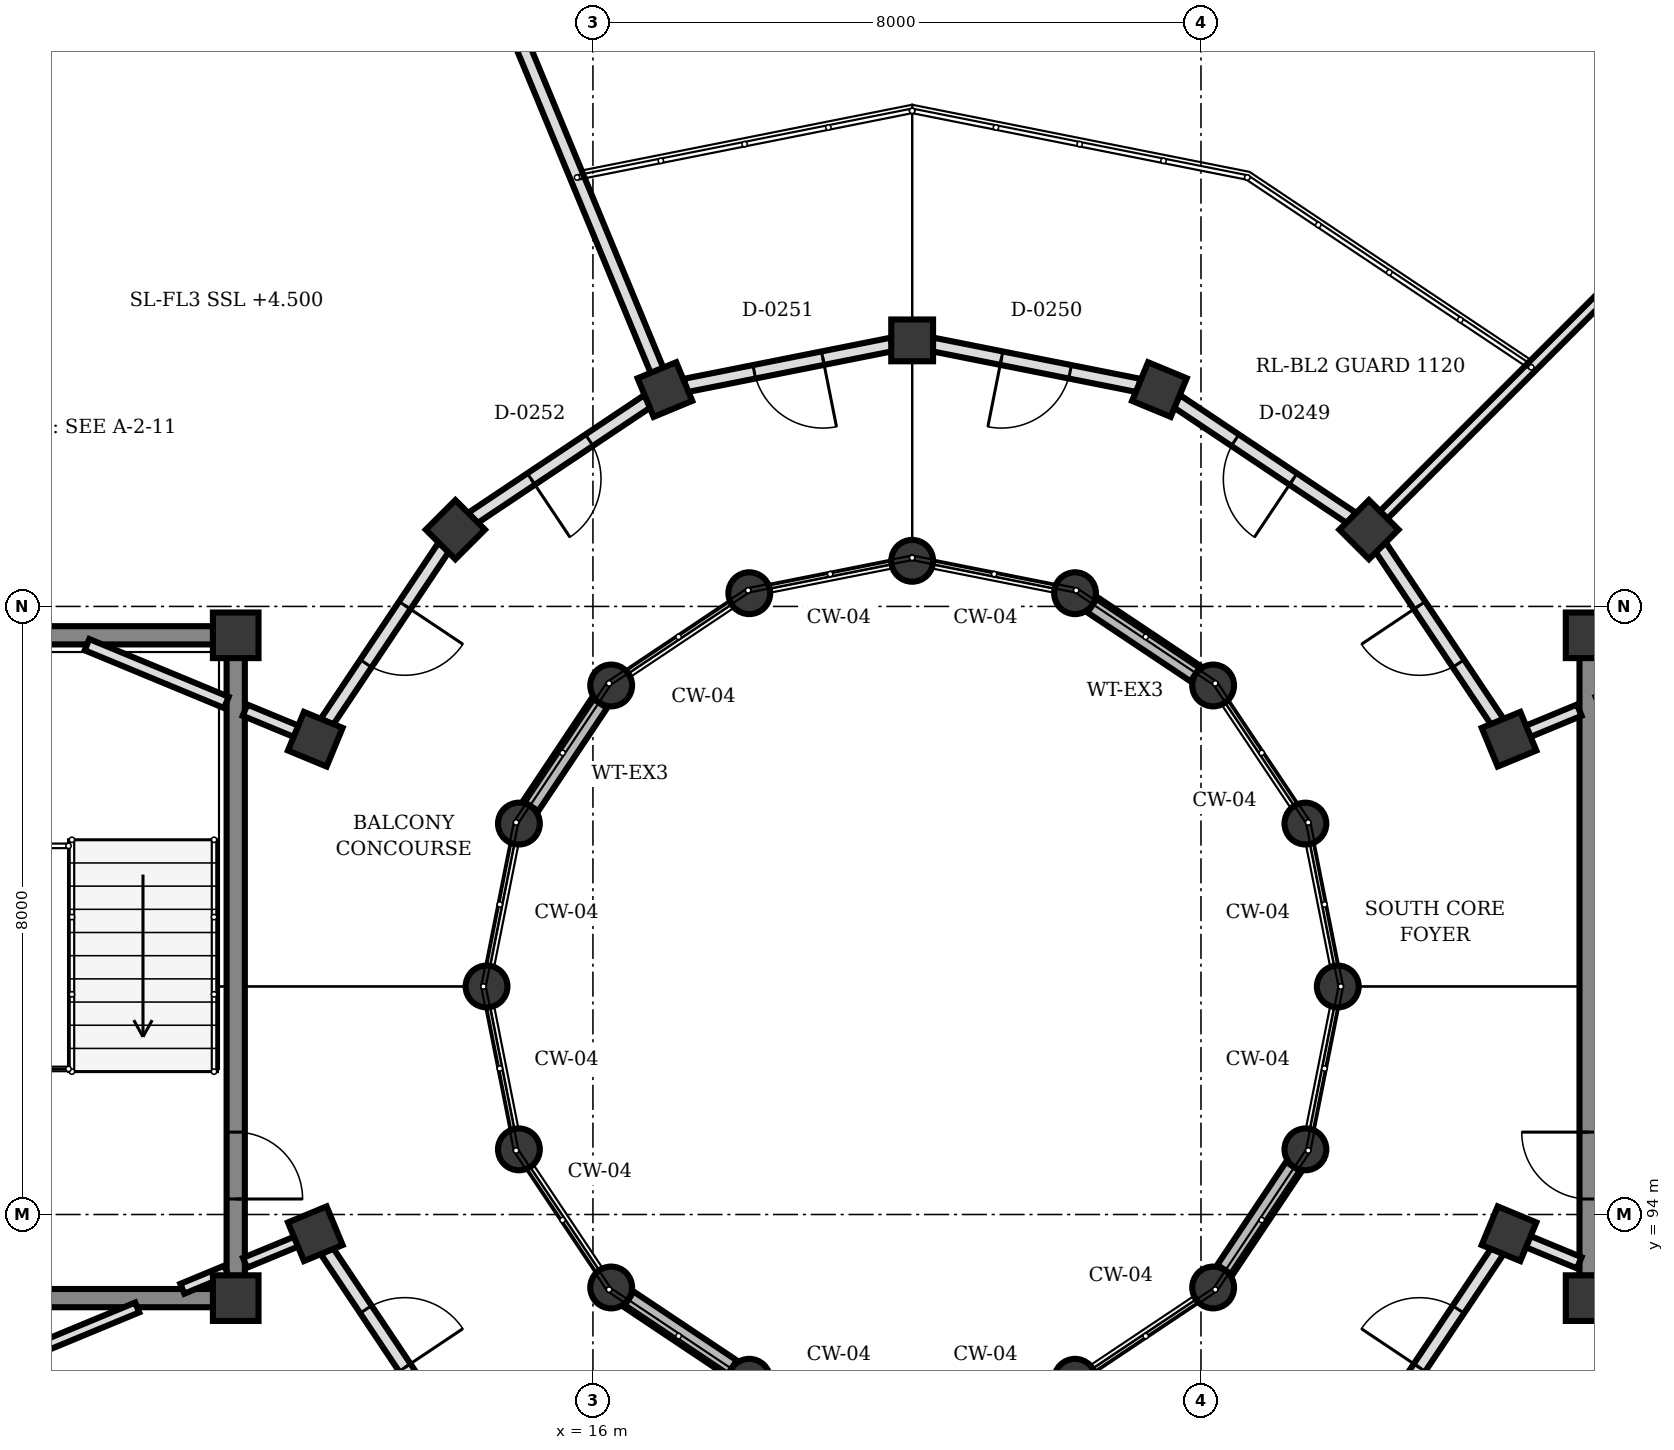
"""IFC4 building model, lengths in metres.
Left out: names, types, materials, properties, quantities, classifications, styles, units other than length and angle.
Written with IfcOpenShell. Run it as: python <this file> out.ifc"""

import sys

from ifc_helpers import new_model, si_unit, direction, frame, frame_2d, origin, origin_2d, place, context, subcontext, project, spatial, rectangle, circle, extrude, element, fill, save


model = new_model("IFC4")
c1 = context("Model", 3, precision=1e-05, world=origin(), true_north=direction((0.0, 1.0)))
c2 = subcontext(c1, "Body", "Model", "MODEL_VIEW")
j1 = project(units=[si_unit("LENGTHUNIT", "METRE"), si_unit("PLANEANGLEUNIT", "RADIAN")], contexts=[c1])
p1 = place(None, origin())
s1 = spatial("IfcSite", under=j1, at=p1, CompositionType="ELEMENT")
p2 = place(p1, origin())
s2 = spatial("IfcBuilding", under=s1, at=p2, CompositionType="ELEMENT")
p3 = place(p2, frame((0.0, 0.0, 4.5)))
s3 = spatial("IfcBuildingStorey", under=s2, at=p3, CompositionType="ELEMENT", Elevation=4.5)
for number, where, z_axis, x_axis in (
    (1, (11.3, 92.9, 0.0), (0.0, 0.0, 1.0), (1.0, 0.0, 0.0)),
    (2, (11.3, 101.62, 0.0), (0.0, 0.0, 1.0), (1.0, 0.0, 0.0)),
    (3, (29.1, 92.9, 0.0), (0.0, 0.0, 1.0), (1.0, 0.0, 0.0)),
    (4, (29.1, 101.62, 0.0), (0.0, 0.0, 1.0), (1.0, 0.0, 0.0)),
):
    element("IfcColumn", number, at=place(p3, frame(where, z_axis=z_axis, x_axis=x_axis)), inside=s3, PredefinedType="COLUMN", context=c2, shape_type="SweptSolid", body=[
        extrude(rectangle(XDim=0.6, YDim=0.6, at=origin_2d()), origin(), (0.0, 0.0, 1.0), 4.0),
    ])
for number, where, z_axis, x_axis in (
    (5, (25.8, 97.0, 0.0), (0.0, 0.0, 1.0), (1.0, 0.0, 0.0)),
    (6, (25.374, 99.143, 0.0), (0.0, 0.0, 1.0), (1.0, 0.0, 0.0)),
    (7, (24.16, 100.96, 0.0), (0.0, 0.0, 1.0), (1.0, 0.0, 0.0)),
    (8, (22.343, 102.174, 0.0), (0.0, 0.0, 1.0), (1.0, 0.0, 0.0)),
    (9, (20.2, 102.6, 0.0), (0.0, 0.0, 1.0), (1.0, 0.0, 0.0)),
    (10, (18.057, 102.174, 0.0), (0.0, 0.0, 1.0), (1.0, 0.0, 0.0)),
    (11, (16.24, 100.96, 0.0), (0.0, 0.0, 1.0), (1.0, 0.0, 0.0)),
    (12, (15.026, 99.143, 0.0), (0.0, 0.0, 1.0), (1.0, 0.0, 0.0)),
    (13, (14.6, 97.0, 0.0), (0.0, 0.0, 1.0), (1.0, 0.0, 0.0)),
    (14, (15.026, 94.857, 0.0), (0.0, 0.0, 1.0), (1.0, 0.0, 0.0)),
    (15, (16.24, 93.04, 0.0), (0.0, 0.0, 1.0), (1.0, 0.0, 0.0)),
    (16, (18.057, 91.826, 0.0), (0.0, 0.0, 1.0), (1.0, 0.0, 0.0)),
    (17, (22.343, 91.826, 0.0), (0.0, 0.0, 1.0), (1.0, 0.0, 0.0)),
    (18, (24.16, 93.04, 0.0), (0.0, 0.0, 1.0), (1.0, 0.0, 0.0)),
    (19, (25.374, 94.857, 0.0), (0.0, 0.0, 1.0), (1.0, 0.0, 0.0)),
):
    element("IfcColumn", number, at=place(p3, frame(where, z_axis=z_axis, x_axis=x_axis)), inside=s3, PredefinedType="COLUMN", context=c2, shape_type="SweptSolid", body=[
        extrude(circle(Radius=0.275, at=origin_2d()), origin(), (0.0, 0.0, 1.0), 4.0),
    ])
for number, where, z_axis, x_axis in (
    (20, (28.053, 100.253, 0.0), (0.0, 0.0, 1.0), (0.924, 0.383, 0.0)),
    (21, (26.21, 103.01, 0.0), (0.0, 0.0, 1.0), (0.707, 0.707, 0.0)),
    (22, (23.453, 104.853, 0.0), (0.0, 0.0, 1.0), (0.383, 0.924, 0.0)),
    (23, (20.2, 105.5, 0.0), (0.0, 0.0, 1.0), (0.0, 1.0, 0.0)),
    (24, (16.947, 104.853, 0.0), (0.0, 0.0, 1.0), (-0.383, 0.924, 0.0)),
    (25, (14.19, 103.01, 0.0), (0.0, 0.0, 1.0), (-0.707, 0.707, 0.0)),
    (26, (12.347, 100.253, 0.0), (0.0, 0.0, 1.0), (-0.924, 0.383, 0.0)),
    (27, (12.347, 93.747, 0.0), (0.0, 0.0, 1.0), (-0.924, -0.383, 0.0)),
    (28, (28.053, 93.747, 0.0), (0.0, 0.0, 1.0), (0.924, -0.383, 0.0)),
):
    element("IfcColumn", number, at=place(p3, frame(where, z_axis=z_axis, x_axis=x_axis)), inside=s3, PredefinedType="COLUMN", context=c2, shape_type="SweptSolid", body=[
        extrude(rectangle(XDim=0.55, YDim=0.55, at=origin_2d()), origin(), (0.0, 0.0, 1.0), 4.0),
    ])
for number, where, z_axis, x_axis in (
    (29, (23.93, 101.114, 0.0), (0.0, 0.0, 1.0), (-0.832, 0.555, 0.0)),
    (30, (16.086, 100.73, 0.0), (0.0, 0.0, 1.0), (-0.555, -0.832, 0.0)),
    (31, (16.47, 92.886, 0.0), (0.0, 0.0, 1.0), (0.832, -0.555, 0.0)),
    (32, (24.314, 93.27, 0.0), (0.0, 0.0, 1.0), (0.555, 0.832, 0.0)),
):
    element("IfcWall", number, at=place(p3, frame(where, z_axis=z_axis, x_axis=x_axis)), inside=s3, PredefinedType="SOLIDWALL", context=c2, shape_type="SweptSolid", body=[
        extrude(rectangle(XDim=1.632, YDim=0.24, at=frame_2d((0.816, 0.0))), origin(), (0.0, 0.0, 1.0), 3.222),
    ])
p4 = place(p3, frame((11.3, 101.328, 0.0), z_axis=(0.0, 0.0, 1.0), x_axis=(0.0, -1.0, 0.0)))
e33 = element("IfcWall", 33, at=p4, inside=s3, PredefinedType="SHEAR", context=c2, shape_type="SweptSolid", body=[
    extrude(rectangle(XDim=8.136, YDim=0.24, at=frame_2d((4.068, 0.0))), origin(), (0.0, 0.0, 1.0), 3.74),
])
p5 = place(p4, frame((6.244, 0.0, 0.0)))
e34 = element("IfcOpeningElement", 34, at=p5, cuts=e33, PredefinedType="OPENING", context=c2, shape_type="SweptSolid", body=[
    extrude(rectangle(XDim=0.88, YDim=2.1, at=frame_2d((0.44, 1.05))), frame((0.0, 0.13, 0.0), z_axis=(0.0, -1.0, 0.0), x_axis=(1.0, 0.0, 0.0)), (0.0, 0.0, 1.0), 0.26),
])
for number, where, z_axis, x_axis in (
    (35, (11.008, 92.9, 0.0), (0.0, 0.0, 1.0), (-1.0, 0.0, 0.0)),
    (36, (11.008, 101.62, 0.0), (0.0, 0.0, 1.0), (-1.0, 0.0, 0.0)),
):
    element("IfcWall", number, at=place(p3, frame(where, z_axis=z_axis, x_axis=x_axis)), inside=s3, PredefinedType="SHEAR", context=c2, shape_type="SweptSolid", body=[
        extrude(rectangle(XDim=4.216, YDim=0.24, at=frame_2d((2.108, 0.0))), origin(), (0.0, 0.0, 1.0), 3.74),
    ])
p6 = place(p3, frame((29.1, 93.192, 0.0), z_axis=(0.0, 0.0, 1.0), x_axis=(0.0, 1.0, 0.0)))
e37 = element("IfcWall", 37, at=p6, inside=s3, PredefinedType="SHEAR", context=c2, shape_type="SweptSolid", body=[
    extrude(rectangle(XDim=8.136, YDim=0.24, at=frame_2d((4.068, 0.0))), origin(), (0.0, 0.0, 1.0), 3.74),
])
p7 = place(p6, frame((1.012, 0.0, 0.0)))
e38 = element("IfcOpeningElement", 38, at=p7, cuts=e37, PredefinedType="OPENING", context=c2, shape_type="SweptSolid", body=[
    extrude(rectangle(XDim=0.88, YDim=2.1, at=frame_2d((0.44, 1.05))), frame((0.0, 0.13, 0.0), z_axis=(0.0, -1.0, 0.0), x_axis=(1.0, 0.0, 0.0)), (0.0, 0.0, 1.0), 0.26),
])
p8 = place(p3, frame((28.3, 100.355, 0.0), z_axis=(0.0, 0.0, 1.0), x_axis=(0.924069600435, 0.382224245113, 0.0)))
e39 = element("IfcWall", 39, at=p8, inside=s3, PredefinedType="PARTITIONING", context=c2, shape_type="SweptSolid", body=[
    extrude(rectangle(XDim=0.733, YDim=0.16, at=frame_2d((0.366, 0.0))), origin(), (0.0, 0.0, 1.0), 3.7),
])
p9 = place(p3, frame((26.399, 103.199, 0.0), z_axis=(0.0, 0.0, 1.0), x_axis=(0.707106781187, 0.707106781187, 0.0)))
e40 = element("IfcWall", 40, at=p9, inside=s3, PredefinedType="PARTITIONING", context=c2, shape_type="SweptSolid", body=[
    extrude(rectangle(XDim=8.441, YDim=0.14, at=frame_2d((4.221, 0.0))), origin(), (0.0, 0.0, 1.0), 3.072),
])
p10 = place(p3, frame((12.1, 100.355, 0.0), z_axis=(0.0, 0.0, 1.0), x_axis=(-0.924069600435, 0.382224245113, 0.0)))
e41 = element("IfcWall", 41, at=p10, inside=s3, PredefinedType="PARTITIONING", context=c2, shape_type="SweptSolid", body=[
    extrude(rectangle(XDim=0.733, YDim=0.16, at=frame_2d((0.366, 0.0))), origin(), (0.0, 0.0, 1.0), 3.7),
])
p11 = place(p3, frame((11.177, 100.737, 0.0), z_axis=(0.0, 0.0, 1.0), x_axis=(-0.923817443679, 0.382833293686, 0.0)))
e42 = element("IfcWall", 42, at=p11, inside=s3, PredefinedType="PARTITIONING", context=c2, shape_type="SweptSolid", body=[
    extrude(rectangle(XDim=1.985, YDim=0.16, at=frame_2d((0.993, 0.0))), origin(), (0.0, 0.0, 1.0), 3.7),
])
p12 = place(p3, frame((12.1, 93.645, 0.0), z_axis=(0.0, 0.0, 1.0), x_axis=(-0.924069600435, -0.382224245113, 0.0)))
e43 = element("IfcWall", 43, at=p12, inside=s3, PredefinedType="PARTITIONING", context=c2, shape_type="SweptSolid", body=[
    extrude(rectangle(XDim=0.733, YDim=0.14, at=frame_2d((0.366, 0.0))), origin(), (0.0, 0.0, 1.0), 3.072),
])
p13 = place(p3, frame((11.177, 93.263, 0.0), z_axis=(0.0, 0.0, 1.0), x_axis=(-0.923812676193, -0.382844797933, 0.0)))
e44 = element("IfcWall", 44, at=p13, inside=s3, PredefinedType="PARTITIONING", context=c2, shape_type="SweptSolid", body=[
    extrude(rectangle(XDim=0.627, YDim=0.14, at=frame_2d((0.313, 0.0))), origin(), (0.0, 0.0, 1.0), 3.072),
])
p14 = place(p3, frame((10.004, 92.777, 0.0), z_axis=(0.0, 0.0, 1.0), x_axis=(-0.923864955254, -0.382718623082, 0.0)))
e45 = element("IfcWall", 45, at=p14, inside=s3, PredefinedType="PARTITIONING", context=c2, shape_type="SweptSolid", body=[
    extrude(rectangle(XDim=6.172, YDim=0.14, at=frame_2d((3.086, 0.0))), origin(), (0.0, 0.0, 1.0), 3.072),
])
p15 = place(p3, frame((28.3, 93.645, 0.0), z_axis=(0.0, 0.0, 1.0), x_axis=(0.924069600435, -0.382224245113, 0.0)))
e46 = element("IfcWall", 46, at=p15, inside=s3, PredefinedType="PARTITIONING", context=c2, shape_type="SweptSolid", body=[
    extrude(rectangle(XDim=0.733, YDim=0.16, at=frame_2d((0.366, 0.0))), origin(), (0.0, 0.0, 1.0), 3.072),
])
p16 = place(p3, frame((27.902, 100.479, 0.0), z_axis=(0.0, 0.0, 1.0), x_axis=(-0.555797002478, 0.831318045056, 0.0)))
e47 = element("IfcWall", 47, at=p16, inside=s3, PredefinedType="PARTITIONING", context=c2, shape_type="SweptSolid", body=[
    extrude(rectangle(XDim=2.773, YDim=0.18, at=frame_2d((1.386, 0.0))), origin(), (0.0, 0.0, 1.0), 3.072),
])
p17 = place(p16, frame((0.926, 0.0, 0.0)))
e48 = element("IfcOpeningElement", 48, at=p17, cuts=e47, PredefinedType="OPENING", context=c2, shape_type="SweptSolid", body=[
    extrude(rectangle(XDim=0.92, YDim=2.1, at=frame_2d((0.46, 1.05))), frame((0.0, 0.1, 0.0), z_axis=(0.0, -1.0, 0.0), x_axis=(1.0, 0.0, 0.0)), (0.0, 0.0, 1.0), 0.2),
])
p18 = place(p3, frame((25.984, 103.161, 0.0), z_axis=(0.0, 0.0, 1.0), x_axis=(-0.831318045056, 0.555797002478, 0.0)))
e49 = element("IfcWall", 49, at=p18, inside=s3, PredefinedType="PARTITIONING", context=c2, shape_type="SweptSolid", body=[
    extrude(rectangle(XDim=2.773, YDim=0.18, at=frame_2d((1.386, 0.0))), origin(), (0.0, 0.0, 1.0), 3.072),
])
p19 = place(p18, frame((0.926, 0.0, 0.0)))
e50 = element("IfcOpeningElement", 50, at=p19, cuts=e49, PredefinedType="OPENING", context=c2, shape_type="SweptSolid", body=[
    extrude(rectangle(XDim=0.92, YDim=2.1, at=frame_2d((0.46, 1.05))), frame((0.0, 0.1, 0.0), z_axis=(0.0, -1.0, 0.0), x_axis=(1.0, 0.0, 0.0)), (0.0, 0.0, 1.0), 0.2),
])
p20 = place(p3, frame((23.186, 104.906, 0.0), z_axis=(0.0, 0.0, 1.0), x_axis=(-0.980773264811, 0.195150718759, 0.0)))
e51 = element("IfcWall", 51, at=p20, inside=s3, PredefinedType="PARTITIONING", context=c2, shape_type="SweptSolid", body=[
    extrude(rectangle(XDim=2.772, YDim=0.18, at=frame_2d((1.386, 0.0))), origin(), (0.0, 0.0, 1.0), 3.072),
])
p21 = place(p20, frame((0.926, 0.0, 0.0)))
e52 = element("IfcOpeningElement", 52, at=p21, cuts=e51, PredefinedType="OPENING", context=c2, shape_type="SweptSolid", body=[
    extrude(rectangle(XDim=0.92, YDim=2.1, at=frame_2d((0.46, 1.05))), frame((0.0, 0.1, 0.0), z_axis=(0.0, -1.0, 0.0), x_axis=(1.0, 0.0, 0.0)), (0.0, 0.0, 1.0), 0.2),
])
p22 = place(p3, frame((19.933, 105.447, 0.0), z_axis=(0.0, 0.0, 1.0), x_axis=(-0.980773264811, -0.195150718759, 0.0)))
e53 = element("IfcWall", 53, at=p22, inside=s3, PredefinedType="PARTITIONING", context=c2, shape_type="SweptSolid", body=[
    extrude(rectangle(XDim=2.772, YDim=0.18, at=frame_2d((1.386, 0.0))), origin(), (0.0, 0.0, 1.0), 3.072),
])
p23 = place(p22, frame((0.926, 0.0, 0.0)))
e54 = element("IfcOpeningElement", 54, at=p23, cuts=e53, PredefinedType="OPENING", context=c2, shape_type="SweptSolid", body=[
    extrude(rectangle(XDim=0.92, YDim=2.1, at=frame_2d((0.46, 1.05))), frame((0.0, 0.1, 0.0), z_axis=(0.0, -1.0, 0.0), x_axis=(1.0, 0.0, 0.0)), (0.0, 0.0, 1.0), 0.2),
])
p24 = place(p3, frame((16.721, 104.702, 0.0), z_axis=(0.0, 0.0, 1.0), x_axis=(-0.831318045056, -0.555797002478, 0.0)))
e55 = element("IfcWall", 55, at=p24, inside=s3, PredefinedType="PARTITIONING", context=c2, shape_type="SweptSolid", body=[
    extrude(rectangle(XDim=2.773, YDim=0.18, at=frame_2d((1.386, 0.0))), origin(), (0.0, 0.0, 1.0), 3.072),
])
p25 = place(p24, frame((0.926, 0.0, 0.0)))
e56 = element("IfcOpeningElement", 56, at=p25, cuts=e55, PredefinedType="OPENING", context=c2, shape_type="SweptSolid", body=[
    extrude(rectangle(XDim=0.92, YDim=2.1, at=frame_2d((0.46, 1.05))), frame((0.0, 0.1, 0.0), z_axis=(0.0, -1.0, 0.0), x_axis=(1.0, 0.0, 0.0)), (0.0, 0.0, 1.0), 0.2),
])
p26 = place(p3, frame((14.039, 102.784, 0.0), z_axis=(0.0, 0.0, 1.0), x_axis=(-0.555797002478, -0.831318045056, 0.0)))
e57 = element("IfcWall", 57, at=p26, inside=s3, PredefinedType="PARTITIONING", context=c2, shape_type="SweptSolid", body=[
    extrude(rectangle(XDim=2.773, YDim=0.18, at=frame_2d((1.386, 0.0))), origin(), (0.0, 0.0, 1.0), 3.072),
])
p27 = place(p26, frame((0.926, 0.0, 0.0)))
e58 = element("IfcOpeningElement", 58, at=p27, cuts=e57, PredefinedType="OPENING", context=c2, shape_type="SweptSolid", body=[
    extrude(rectangle(XDim=0.92, YDim=2.1, at=frame_2d((0.46, 1.05))), frame((0.0, 0.1, 0.0), z_axis=(0.0, -1.0, 0.0), x_axis=(1.0, 0.0, 0.0)), (0.0, 0.0, 1.0), 0.2),
])
p28 = place(p3, frame((12.498, 93.521, 0.0), z_axis=(0.0, 0.0, 1.0), x_axis=(0.555797002478, -0.831318045056, 0.0)))
e59 = element("IfcWall", 59, at=p28, inside=s3, PredefinedType="PARTITIONING", context=c2, shape_type="SweptSolid", body=[
    extrude(rectangle(XDim=2.773, YDim=0.18, at=frame_2d((1.386, 0.0))), origin(), (0.0, 0.0, 1.0), 3.072),
])
p29 = place(p28, frame((0.926, 0.0, 0.0)))
e60 = element("IfcOpeningElement", 60, at=p29, cuts=e59, PredefinedType="OPENING", context=c2, shape_type="SweptSolid", body=[
    extrude(rectangle(XDim=0.92, YDim=2.1, at=frame_2d((0.46, 1.05))), frame((0.0, 0.1, 0.0), z_axis=(0.0, -1.0, 0.0), x_axis=(1.0, 0.0, 0.0)), (0.0, 0.0, 1.0), 0.2),
])
p30 = place(p3, frame((26.361, 91.216, 0.0), z_axis=(0.0, 0.0, 1.0), x_axis=(0.555797002478, 0.831318045056, 0.0)))
e61 = element("IfcWall", 61, at=p30, inside=s3, PredefinedType="PARTITIONING", context=c2, shape_type="SweptSolid", body=[
    extrude(rectangle(XDim=2.773, YDim=0.18, at=frame_2d((1.386, 0.0))), origin(), (0.0, 0.0, 1.0), 3.072),
])
p31 = place(p30, frame((0.926, 0.0, 0.0)))
e62 = element("IfcOpeningElement", 62, at=p31, cuts=e61, PredefinedType="OPENING", context=c2, shape_type="SweptSolid", body=[
    extrude(rectangle(XDim=0.92, YDim=2.1, at=frame_2d((0.46, 1.05))), frame((0.0, 0.1, 0.0), z_axis=(0.0, -1.0, 0.0), x_axis=(1.0, 0.0, 0.0)), (0.0, 0.0, 1.0), 0.2),
])
p32 = place(p3, frame((16.845, 105.1, 0.0), z_axis=(0.0, 0.0, 1.0), x_axis=(-0.382683896966, 0.923879340067, 0.0)))
e63 = element("IfcWall", 63, at=p32, inside=s3, PredefinedType="PARTITIONING", context=c2, shape_type="SweptSolid", body=[
    extrude(rectangle(XDim=8.44, YDim=0.18, at=frame_2d((4.22, 0.0))), origin(), (0.0, 0.0, 1.0), 3.072),
])
p33 = place(p5, origin())
e64 = element("IfcDoor", 64, at=p33, inside=s3, OperationType="SINGLE_SWING_RIGHT", PredefinedType="DOOR", context=c2, shape_type="SweptSolid", body=[
    extrude(rectangle(XDim=0.88, YDim=2.1, at=frame_2d((0.44, 1.05))), frame((0.0, 0.025, 0.0), z_axis=(0.0, -1.0, 0.0), x_axis=(1.0, 0.0, 0.0)), (0.0, 0.0, 1.0), 0.05),
])
fill(e34, e64)
p34 = place(p7, origin())
e65 = element("IfcDoor", 65, at=p34, inside=s3, OperationType="SINGLE_SWING_RIGHT", PredefinedType="DOOR", context=c2, shape_type="SweptSolid", body=[
    extrude(rectangle(XDim=0.88, YDim=2.1, at=frame_2d((0.44, 1.05))), frame((0.0, 0.025, 0.0), z_axis=(0.0, -1.0, 0.0), x_axis=(1.0, 0.0, 0.0)), (0.0, 0.0, 1.0), 0.05),
])
fill(e38, e65)
p35 = place(p17, origin())
e66 = element("IfcDoor", 66, at=p35, inside=s3, OperationType="SINGLE_SWING_RIGHT", PredefinedType="DOOR", context=c2, shape_type="SweptSolid", body=[
    extrude(rectangle(XDim=0.92, YDim=2.1, at=frame_2d((0.46, 1.05))), frame((0.0, 0.025, 0.0), z_axis=(0.0, -1.0, 0.0), x_axis=(1.0, 0.0, 0.0)), (0.0, 0.0, 1.0), 0.05),
])
fill(e48, e66)
p36 = place(p19, origin())
e67 = element("IfcDoor", 67, at=p36, inside=s3, OperationType="SINGLE_SWING_LEFT", PredefinedType="DOOR", context=c2, shape_type="SweptSolid", body=[
    extrude(rectangle(XDim=0.92, YDim=2.1, at=frame_2d((0.46, 1.05))), frame((0.0, 0.025, 0.0), z_axis=(0.0, -1.0, 0.0), x_axis=(1.0, 0.0, 0.0)), (0.0, 0.0, 1.0), 0.05),
])
fill(e50, e67)
p37 = place(p21, origin())
e68 = element("IfcDoor", 68, at=p37, inside=s3, OperationType="SINGLE_SWING_RIGHT", PredefinedType="DOOR", context=c2, shape_type="SweptSolid", body=[
    extrude(rectangle(XDim=0.92, YDim=2.1, at=frame_2d((0.46, 1.05))), frame((0.0, 0.025, 0.0), z_axis=(0.0, -1.0, 0.0), x_axis=(1.0, 0.0, 0.0)), (0.0, 0.0, 1.0), 0.05),
])
fill(e52, e68)
p38 = place(p23, origin())
e69 = element("IfcDoor", 69, at=p38, inside=s3, OperationType="SINGLE_SWING_LEFT", PredefinedType="DOOR", context=c2, shape_type="SweptSolid", body=[
    extrude(rectangle(XDim=0.92, YDim=2.1, at=frame_2d((0.46, 1.05))), frame((0.0, 0.025, 0.0), z_axis=(0.0, -1.0, 0.0), x_axis=(1.0, 0.0, 0.0)), (0.0, 0.0, 1.0), 0.05),
])
fill(e54, e69)
p39 = place(p25, origin())
e70 = element("IfcDoor", 70, at=p39, inside=s3, OperationType="SINGLE_SWING_RIGHT", PredefinedType="DOOR", context=c2, shape_type="SweptSolid", body=[
    extrude(rectangle(XDim=0.92, YDim=2.1, at=frame_2d((0.46, 1.05))), frame((0.0, 0.025, 0.0), z_axis=(0.0, -1.0, 0.0), x_axis=(1.0, 0.0, 0.0)), (0.0, 0.0, 1.0), 0.05),
])
fill(e56, e70)
p40 = place(p27, origin())
e71 = element("IfcDoor", 71, at=p40, inside=s3, OperationType="SINGLE_SWING_LEFT", PredefinedType="DOOR", context=c2, shape_type="SweptSolid", body=[
    extrude(rectangle(XDim=0.92, YDim=2.1, at=frame_2d((0.46, 1.05))), frame((0.0, 0.025, 0.0), z_axis=(0.0, -1.0, 0.0), x_axis=(1.0, 0.0, 0.0)), (0.0, 0.0, 1.0), 0.05),
])
fill(e58, e71)
p41 = place(p29, origin())
e72 = element("IfcDoor", 72, at=p41, inside=s3, OperationType="SINGLE_SWING_RIGHT", PredefinedType="DOOR", context=c2, shape_type="SweptSolid", body=[
    extrude(rectangle(XDim=0.92, YDim=2.1, at=frame_2d((0.46, 1.05))), frame((0.0, 0.025, 0.0), z_axis=(0.0, -1.0, 0.0), x_axis=(1.0, 0.0, 0.0)), (0.0, 0.0, 1.0), 0.05),
])
fill(e60, e72)
p42 = place(p31, origin())
e73 = element("IfcDoor", 73, at=p42, inside=s3, OperationType="SINGLE_SWING_LEFT", PredefinedType="DOOR", context=c2, shape_type="SweptSolid", body=[
    extrude(rectangle(XDim=0.92, YDim=2.1, at=frame_2d((0.46, 1.05))), frame((0.0, 0.025, 0.0), z_axis=(0.0, -1.0, 0.0), x_axis=(1.0, 0.0, 0.0)), (0.0, 0.0, 1.0), 0.05),
])
fill(e62, e73)
save(model, sys.argv[1])
